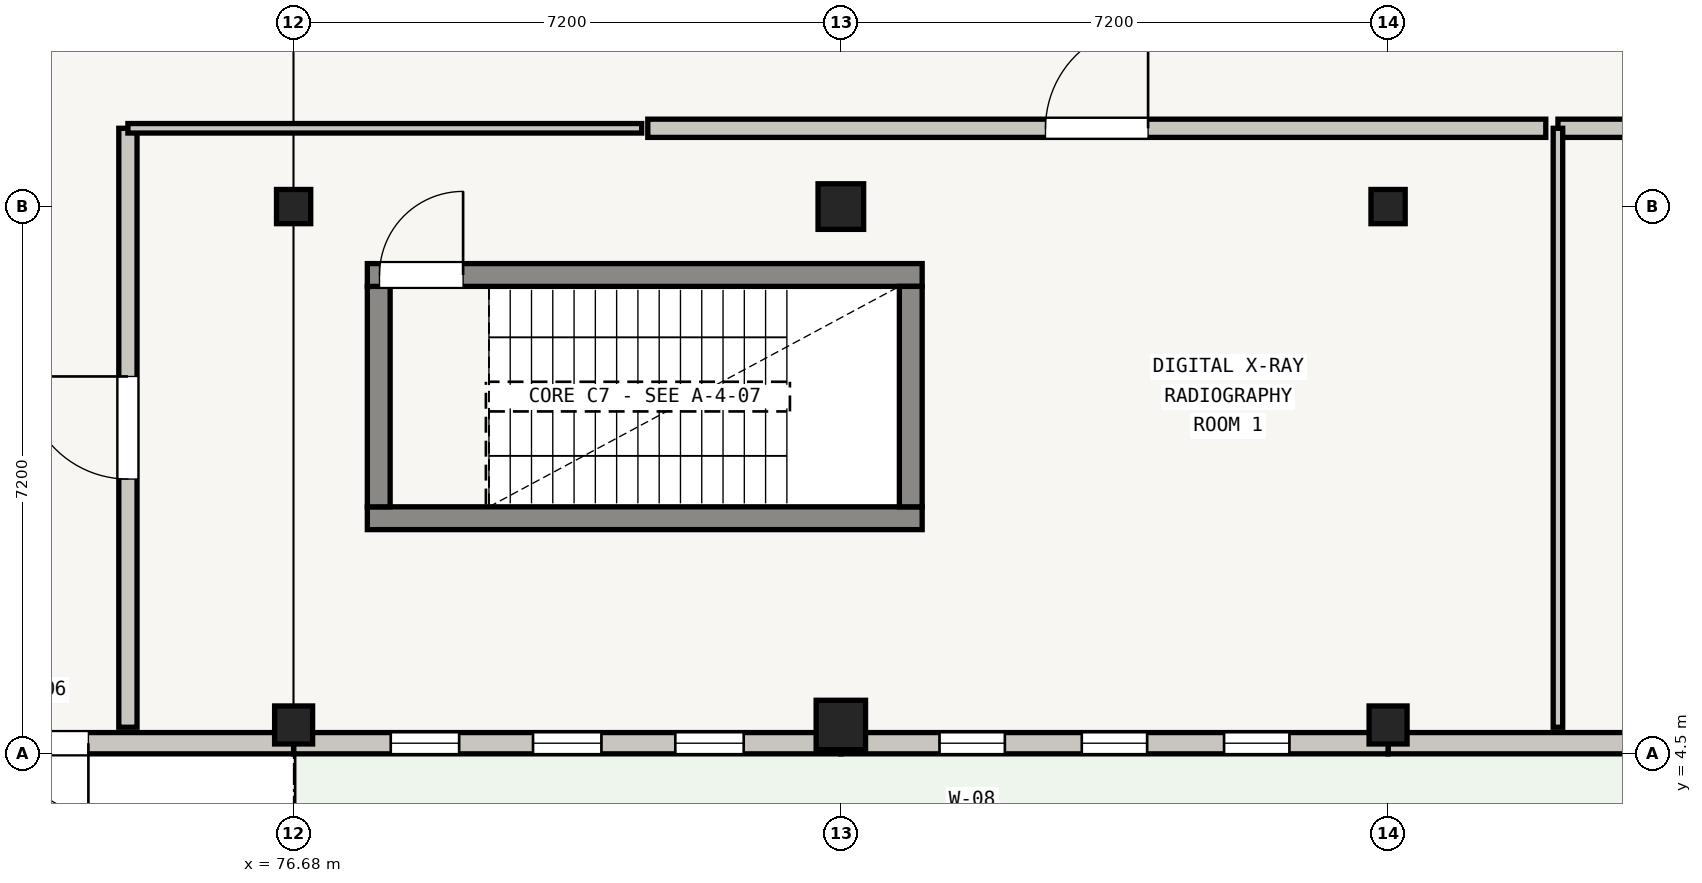
"""IFC4 building model, lengths in metres.
Left out: names, types, materials, properties, quantities, classifications, styles, units other than length and angle.
Written with IfcOpenShell. Run it as: python <this file> out.ifc"""

import sys

from ifc_helpers import new_model, si_unit, direction, frame, frame_2d, origin, origin_2d, place, context, subcontext, project, spatial, rectangle, extrude, element, fill, save


model = new_model("IFC4")
c1 = context("Model", 3, precision=1e-05, world=origin(), true_north=direction((0.0, 1.0)))
c2 = subcontext(c1, "Body", "Model", "MODEL_VIEW")
j1 = project(units=[si_unit("LENGTHUNIT", "METRE"), si_unit("PLANEANGLEUNIT", "RADIAN")], contexts=[c1])
p1 = place(None, origin())
s1 = spatial("IfcSite", under=j1, at=p1, CompositionType="ELEMENT")
p2 = place(p1, origin())
s2 = spatial("IfcBuilding", under=s1, at=p2, CompositionType="ELEMENT")
p3 = place(p2, origin())
s3 = spatial("IfcBuildingStorey", under=s2, at=p3, CompositionType="ELEMENT", Elevation=0.0)
p4 = place(p3, frame((76.68, 4.88, 0.0), z_axis=(0.0, 0.0, 1.0), x_axis=(1.0, 0.0, 0.0)))
e1 = element("IfcColumn", 1, at=p4, inside=s3, PredefinedType="COLUMN", context=c2, shape_type="SweptSolid", body=[
    extrude(rectangle(XDim=0.5, YDim=0.5, at=origin_2d()), origin(), (0.0, 0.0, 1.0), 4.185),
])
p5 = place(p3, frame((76.68, 11.7, 0.0), z_axis=(0.0, 0.0, 1.0), x_axis=(1.0, 0.0, 0.0)))
e2 = element("IfcColumn", 2, at=p5, inside=s3, PredefinedType="COLUMN", context=c2, shape_type="SweptSolid", body=[
    extrude(rectangle(XDim=0.45, YDim=0.45, at=origin_2d()), origin(), (0.0, 0.0, 1.0), 4.185),
])
p6 = place(p3, frame((83.88, 4.88, 0.0), z_axis=(0.0, 0.0, 1.0), x_axis=(1.0, 0.0, 0.0)))
e3 = element("IfcColumn", 3, at=p6, inside=s3, PredefinedType="COLUMN", context=c2, shape_type="SweptSolid", body=[
    extrude(rectangle(XDim=0.65, YDim=0.65, at=origin_2d()), origin(), (0.0, 0.0, 1.0), 4.185),
])
p7 = place(p3, frame((83.88, 11.7, 0.0), z_axis=(0.0, 0.0, 1.0), x_axis=(1.0, 0.0, 0.0)))
e4 = element("IfcColumn", 4, at=p7, inside=s3, PredefinedType="COLUMN", context=c2, shape_type="SweptSolid", body=[
    extrude(rectangle(XDim=0.6, YDim=0.6, at=origin_2d()), origin(), (0.0, 0.0, 1.0), 4.185),
])
p8 = place(p3, frame((91.08, 4.88, 0.0), z_axis=(0.0, 0.0, 1.0), x_axis=(1.0, 0.0, 0.0)))
e5 = element("IfcColumn", 5, at=p8, inside=s3, PredefinedType="COLUMN", context=c2, shape_type="SweptSolid", body=[
    extrude(rectangle(XDim=0.5, YDim=0.5, at=origin_2d()), origin(), (0.0, 0.0, 1.0), 4.185),
])
p9 = place(p3, frame((91.08, 11.7, 0.0), z_axis=(0.0, 0.0, 1.0), x_axis=(1.0, 0.0, 0.0)))
e6 = element("IfcColumn", 6, at=p9, inside=s3, PredefinedType="COLUMN", context=c2, shape_type="SweptSolid", body=[
    extrude(rectangle(XDim=0.45, YDim=0.45, at=origin_2d()), origin(), (0.0, 0.0, 1.0), 4.185),
])
p10 = place(p3, frame((98.28, 4.64, 0.0), z_axis=(0.0, 0.0, 1.0), x_axis=(-1.0, 0.0, 0.0)))
e7 = element("IfcWall", 7, at=p10, inside=s3, PredefinedType="STANDARD", context=c2, shape_type="SweptSolid", body=[
    extrude(rectangle(XDim=7.2, YDim=0.28, at=frame_2d((3.6, 0.0))), origin(), (0.0, 0.0, 1.0), 3.55),
])
p11 = place(p10, frame((1.318, 0.0, 0.55)))
e8 = element("IfcOpeningElement", 8, at=p11, cuts=e7, PredefinedType="OPENING", context=c2, shape_type="SweptSolid", body=[
    extrude(rectangle(XDim=0.82, YDim=2.2, at=frame_2d((0.41, 1.1))), frame((0.0, 0.14, 0.0), z_axis=(0.0, -1.0, 0.0), x_axis=(1.0, 0.0, 0.0)), (0.0, 0.0, 1.0), 0.28),
])
p12 = place(p10, frame((3.19, 0.0, 0.55)))
e9 = element("IfcOpeningElement", 9, at=p12, cuts=e7, PredefinedType="OPENING", context=c2, shape_type="SweptSolid", body=[
    extrude(rectangle(XDim=0.82, YDim=2.2, at=frame_2d((0.41, 1.1))), frame((0.0, 0.14, 0.0), z_axis=(0.0, -1.0, 0.0), x_axis=(1.0, 0.0, 0.0)), (0.0, 0.0, 1.0), 0.28),
])
p13 = place(p3, frame((91.08, 4.64, 0.0), z_axis=(0.0, 0.0, 1.0), x_axis=(-1.0, 0.0, 0.0)))
e10 = element("IfcWall", 10, at=p13, inside=s3, PredefinedType="STANDARD", context=c2, shape_type="SweptSolid", body=[
    extrude(rectangle(XDim=7.2, YDim=0.28, at=frame_2d((3.6, 0.0))), origin(), (0.0, 0.0, 1.0), 3.55),
])
p14 = place(p13, frame((1.298, 0.0, 0.55)))
e11 = element("IfcOpeningElement", 11, at=p14, cuts=e10, PredefinedType="OPENING", context=c2, shape_type="SweptSolid", body=[
    extrude(rectangle(XDim=0.86, YDim=2.2, at=frame_2d((0.43, 1.1))), frame((0.0, 0.14, 0.0), z_axis=(0.0, -1.0, 0.0), x_axis=(1.0, 0.0, 0.0)), (0.0, 0.0, 1.0), 0.28),
])
p15 = place(p13, frame((3.17, 0.0, 0.55)))
e12 = element("IfcOpeningElement", 12, at=p15, cuts=e10, PredefinedType="OPENING", context=c2, shape_type="SweptSolid", body=[
    extrude(rectangle(XDim=0.86, YDim=2.2, at=frame_2d((0.43, 1.1))), frame((0.0, 0.14, 0.0), z_axis=(0.0, -1.0, 0.0), x_axis=(1.0, 0.0, 0.0)), (0.0, 0.0, 1.0), 0.28),
])
p16 = place(p13, frame((5.042, 0.0, 0.55)))
e13 = element("IfcOpeningElement", 13, at=p16, cuts=e10, PredefinedType="OPENING", context=c2, shape_type="SweptSolid", body=[
    extrude(rectangle(XDim=0.86, YDim=2.2, at=frame_2d((0.43, 1.1))), frame((0.0, 0.14, 0.0), z_axis=(0.0, -1.0, 0.0), x_axis=(1.0, 0.0, 0.0)), (0.0, 0.0, 1.0), 0.28),
])
p17 = place(p3, frame((83.88, 4.64, 0.0), z_axis=(0.0, 0.0, 1.0), x_axis=(-1.0, 0.0, 0.0)))
e14 = element("IfcWall", 14, at=p17, inside=s3, PredefinedType="STANDARD", context=c2, shape_type="SweptSolid", body=[
    extrude(rectangle(XDim=7.2, YDim=0.28, at=frame_2d((3.6, 0.0))), origin(), (0.0, 0.0, 1.0), 3.55),
])
p18 = place(p17, frame((1.278, 0.0, 0.55)))
e15 = element("IfcOpeningElement", 15, at=p18, cuts=e14, PredefinedType="OPENING", context=c2, shape_type="SweptSolid", body=[
    extrude(rectangle(XDim=0.9, YDim=2.18, at=frame_2d((0.45, 1.09))), frame((0.0, 0.14, 0.0), z_axis=(0.0, -1.0, 0.0), x_axis=(1.0, 0.0, 0.0)), (0.0, 0.0, 1.0), 0.28),
])
p19 = place(p17, frame((3.15, 0.0, 0.55)))
e16 = element("IfcOpeningElement", 16, at=p19, cuts=e14, PredefinedType="OPENING", context=c2, shape_type="SweptSolid", body=[
    extrude(rectangle(XDim=0.9, YDim=2.18, at=frame_2d((0.45, 1.09))), frame((0.0, 0.14, 0.0), z_axis=(0.0, -1.0, 0.0), x_axis=(1.0, 0.0, 0.0)), (0.0, 0.0, 1.0), 0.28),
])
p20 = place(p17, frame((5.022, 0.0, 0.55)))
e17 = element("IfcOpeningElement", 17, at=p20, cuts=e14, PredefinedType="OPENING", context=c2, shape_type="SweptSolid", body=[
    extrude(rectangle(XDim=0.9, YDim=2.18, at=frame_2d((0.45, 1.09))), frame((0.0, 0.14, 0.0), z_axis=(0.0, -1.0, 0.0), x_axis=(1.0, 0.0, 0.0)), (0.0, 0.0, 1.0), 0.28),
])
p21 = place(p3, frame((76.68, 4.64, 0.0), z_axis=(0.0, 0.0, 1.0), x_axis=(-1.0, 0.0, 0.0)))
e18 = element("IfcWall", 18, at=p21, inside=s3, PredefinedType="STANDARD", context=c2, shape_type="SweptSolid", body=[
    extrude(rectangle(XDim=7.2, YDim=0.28, at=frame_2d((3.6, 0.0))), origin(), (0.0, 0.0, 1.0), 3.57),
])
p22 = place(p21, frame((2.7, 0.0, 0.0)))
e19 = element("IfcOpeningElement", 19, at=p22, cuts=e18, PredefinedType="OPENING", context=c2, shape_type="SweptSolid", body=[
    extrude(rectangle(XDim=1.8, YDim=2.1, at=frame_2d((0.9, 1.05))), frame((0.0, 0.14, 0.0), z_axis=(0.0, -1.0, 0.0), x_axis=(1.0, 0.0, 0.0)), (0.0, 0.0, 1.0), 0.28),
])
p23 = place(p3, frame((84.95, 7.6, 0.0), z_axis=(0.0, 0.0, 1.0), x_axis=(-1.0, 0.0, 0.0)))
e20 = element("IfcWall", 20, at=p23, inside=s3, PredefinedType="SHEAR", context=c2, shape_type="SweptSolid", body=[
    extrude(rectangle(XDim=7.3, YDim=0.3, at=frame_2d((3.65, 0.0))), origin(), (0.0, 0.0, 1.0), 4.185),
])
p24 = place(p3, frame((77.8, 7.75, 0.0), z_axis=(0.0, 0.0, 1.0), x_axis=(0.0, 1.0, 0.0)))
e21 = element("IfcWall", 21, at=p24, inside=s3, PredefinedType="SHEAR", context=c2, shape_type="SweptSolid", body=[
    extrude(rectangle(XDim=2.9, YDim=0.3, at=frame_2d((1.45, 0.0))), origin(), (0.0, 0.0, 1.0), 4.185),
])
p25 = place(p3, frame((77.65, 10.8, 0.0), z_axis=(0.0, 0.0, 1.0), x_axis=(1.0, 0.0, 0.0)))
e22 = element("IfcWall", 22, at=p25, inside=s3, PredefinedType="SHEAR", context=c2, shape_type="SweptSolid", body=[
    extrude(rectangle(XDim=7.3, YDim=0.3, at=frame_2d((3.65, 0.0))), origin(), (0.0, 0.0, 1.0), 4.185),
])
p26 = place(p25, frame((0.16, 0.0, 0.0)))
e23 = element("IfcOpeningElement", 23, at=p26, cuts=e22, PredefinedType="OPENING", context=c2, shape_type="SweptSolid", body=[
    extrude(rectangle(XDim=1.1, YDim=2.05, at=frame_2d((0.55, 1.025))), frame((0.0, 0.15, 0.0), z_axis=(0.0, -1.0, 0.0), x_axis=(1.0, 0.0, 0.0)), (0.0, 0.0, 1.0), 0.3),
])
p27 = place(p3, frame((84.8, 10.65, 0.0), z_axis=(0.0, 0.0, 1.0), x_axis=(0.0, -1.0, 0.0)))
e24 = element("IfcWall", 24, at=p27, inside=s3, PredefinedType="SHEAR", context=c2, shape_type="SweptSolid", body=[
    extrude(rectangle(XDim=2.9, YDim=0.3, at=frame_2d((1.45, 0.0))), origin(), (0.0, 0.0, 1.0), 4.185),
])
p28 = place(p3, frame((93.315, 12.73, 0.0), z_axis=(0.0, 0.0, 1.0), x_axis=(1.0, 0.0, 0.0)))
e25 = element("IfcWall", 25, at=p28, inside=s3, PredefinedType="SOLIDWALL", context=c2, shape_type="SweptSolid", body=[
    extrude(rectangle(XDim=11.815, YDim=0.24, at=frame_2d((5.907, 0.0))), origin(), (0.0, 0.0, 1.0), 3.205),
])
p29 = place(p28, frame((6.802, 0.0, 0.0)))
e26 = element("IfcOpeningElement", 26, at=p29, cuts=e25, PredefinedType="OPENING", context=c2, shape_type="SweptSolid", body=[
    extrude(rectangle(XDim=1.35, YDim=2.1, at=frame_2d((0.675, 1.05))), frame((0.0, 0.12, 0.0), z_axis=(0.0, -1.0, 0.0), x_axis=(1.0, 0.0, 0.0)), (0.0, 0.0, 1.0), 0.24),
])
p30 = place(p3, frame((93.315, 4.85, 0.0), z_axis=(0.0, 0.0, 1.0), x_axis=(0.0, 1.0, 0.0)))
e27 = element("IfcWall", 27, at=p30, inside=s3, PredefinedType="PARTITIONING", context=c2, shape_type="SweptSolid", body=[
    extrude(rectangle(XDim=7.88, YDim=0.125, at=frame_2d((3.94, 0.0))), origin(), (0.0, 0.0, 1.0), 3.205),
])
p31 = place(p3, frame((81.34, 12.73, 0.0), z_axis=(0.0, 0.0, 1.0), x_axis=(1.0, 0.0, 0.0)))
e28 = element("IfcWall", 28, at=p31, inside=s3, PredefinedType="SOLIDWALL", context=c2, shape_type="SweptSolid", body=[
    extrude(rectangle(XDim=11.815, YDim=0.24, at=frame_2d((5.907, 0.0))), origin(), (0.0, 0.0, 1.0), 3.205),
])
p32 = place(p31, frame((5.232, 0.0, 0.0)))
e29 = element("IfcOpeningElement", 29, at=p32, cuts=e28, PredefinedType="OPENING", context=c2, shape_type="SweptSolid", body=[
    extrude(rectangle(XDim=1.35, YDim=2.1, at=frame_2d((0.675, 1.05))), frame((0.0, 0.12, 0.0), z_axis=(0.0, -1.0, 0.0), x_axis=(1.0, 0.0, 0.0)), (0.0, 0.0, 1.0), 0.24),
])
p33 = place(p3, frame((74.5, 4.85, 0.0), z_axis=(0.0, 0.0, 1.0), x_axis=(0.0, 1.0, 0.0)))
e30 = element("IfcWall", 30, at=p33, inside=s3, PredefinedType="SOLIDWALL", context=c2, shape_type="SweptSolid", body=[
    extrude(rectangle(XDim=7.88, YDim=0.24, at=frame_2d((3.94, 0.0))), origin(), (0.0, 0.0, 1.0), 3.205),
])
p34 = place(p33, frame((3.265, 0.0, 0.0)))
e31 = element("IfcOpeningElement", 31, at=p34, cuts=e30, PredefinedType="OPENING", context=c2, shape_type="SweptSolid", body=[
    extrude(rectangle(XDim=1.35, YDim=2.1, at=frame_2d((0.675, 1.05))), frame((0.0, 0.12, 0.0), z_axis=(0.0, -1.0, 0.0), x_axis=(1.0, 0.0, 0.0)), (0.0, 0.0, 1.0), 0.24),
])
p35 = place(p3, frame((74.5, 12.73, 0.0), z_axis=(0.0, 0.0, 1.0), x_axis=(1.0, 0.0, 0.0)))
e32 = element("IfcWall", 32, at=p35, inside=s3, PredefinedType="PARTITIONING", context=c2, shape_type="SweptSolid", body=[
    extrude(rectangle(XDim=6.76, YDim=0.125, at=frame_2d((3.38, 0.0))), origin(), (0.0, 0.0, 1.0), 3.205),
])
p36 = place(p14, origin())
e33 = element("IfcWindow", 33, at=p36, inside=s3, PartitioningType="SINGLE_PANEL", PredefinedType="WINDOW", context=c2, shape_type="SweptSolid", body=[
    extrude(rectangle(XDim=0.86, YDim=2.2, at=frame_2d((0.43, 1.1))), frame((0.0, 0.03, 0.0), z_axis=(0.0, -1.0, 0.0), x_axis=(1.0, 0.0, 0.0)), (0.0, 0.0, 1.0), 0.06),
])
fill(e11, e33)
p37 = place(p15, origin())
e34 = element("IfcWindow", 34, at=p37, inside=s3, PartitioningType="SINGLE_PANEL", PredefinedType="WINDOW", context=c2, shape_type="SweptSolid", body=[
    extrude(rectangle(XDim=0.86, YDim=2.2, at=frame_2d((0.43, 1.1))), frame((0.0, 0.03, 0.0), z_axis=(0.0, -1.0, 0.0), x_axis=(1.0, 0.0, 0.0)), (0.0, 0.0, 1.0), 0.06),
])
fill(e12, e34)
p38 = place(p16, origin())
e35 = element("IfcWindow", 35, at=p38, inside=s3, PartitioningType="SINGLE_PANEL", PredefinedType="WINDOW", context=c2, shape_type="SweptSolid", body=[
    extrude(rectangle(XDim=0.86, YDim=2.2, at=frame_2d((0.43, 1.1))), frame((0.0, 0.03, 0.0), z_axis=(0.0, -1.0, 0.0), x_axis=(1.0, 0.0, 0.0)), (0.0, 0.0, 1.0), 0.06),
])
fill(e13, e35)
p39 = place(p18, origin())
e36 = element("IfcWindow", 36, at=p39, inside=s3, PartitioningType="DOUBLE_PANEL_VERTICAL", PredefinedType="WINDOW", context=c2, shape_type="SweptSolid", body=[
    extrude(rectangle(XDim=0.9, YDim=2.18, at=frame_2d((0.45, 1.09))), frame((0.0, 0.03, 0.0), z_axis=(0.0, -1.0, 0.0), x_axis=(1.0, 0.0, 0.0)), (0.0, 0.0, 1.0), 0.06),
])
fill(e15, e36)
p40 = place(p19, origin())
e37 = element("IfcWindow", 37, at=p40, inside=s3, PartitioningType="DOUBLE_PANEL_VERTICAL", PredefinedType="WINDOW", context=c2, shape_type="SweptSolid", body=[
    extrude(rectangle(XDim=0.9, YDim=2.18, at=frame_2d((0.45, 1.09))), frame((0.0, 0.03, 0.0), z_axis=(0.0, -1.0, 0.0), x_axis=(1.0, 0.0, 0.0)), (0.0, 0.0, 1.0), 0.06),
])
fill(e16, e37)
p41 = place(p20, origin())
e38 = element("IfcWindow", 38, at=p41, inside=s3, PartitioningType="DOUBLE_PANEL_VERTICAL", PredefinedType="WINDOW", context=c2, shape_type="SweptSolid", body=[
    extrude(rectangle(XDim=0.9, YDim=2.18, at=frame_2d((0.45, 1.09))), frame((0.0, 0.03, 0.0), z_axis=(0.0, -1.0, 0.0), x_axis=(1.0, 0.0, 0.0)), (0.0, 0.0, 1.0), 0.06),
])
fill(e17, e38)
p42 = place(p22, origin())
e39 = element("IfcDoor", 39, at=p42, inside=s3, OperationType="DOUBLE_DOOR_SINGLE_SWING", PredefinedType="DOOR", context=c2, shape_type="SweptSolid", body=[
    extrude(rectangle(XDim=1.8, YDim=2.1, at=frame_2d((0.9, 1.05))), frame((0.0, 0.025, 0.0), z_axis=(0.0, -1.0, 0.0), x_axis=(1.0, 0.0, 0.0)), (0.0, 0.0, 1.0), 0.05),
])
fill(e19, e39)
p43 = place(p26, origin())
e40 = element("IfcDoor", 40, at=p43, inside=s3, OperationType="SINGLE_SWING_RIGHT", PredefinedType="DOOR", context=c2, shape_type="SweptSolid", body=[
    extrude(rectangle(XDim=1.1, YDim=2.05, at=frame_2d((0.55, 1.025))), frame((0.0, 0.025, 0.0), z_axis=(0.0, -1.0, 0.0), x_axis=(1.0, 0.0, 0.0)), (0.0, 0.0, 1.0), 0.05),
])
fill(e23, e40)
p44 = place(p32, origin())
e41 = element("IfcDoor", 41, at=p44, inside=s3, OperationType="SINGLE_SWING_RIGHT", PredefinedType="DOOR", context=c2, shape_type="SweptSolid", body=[
    extrude(rectangle(XDim=1.35, YDim=2.1, at=frame_2d((0.675, 1.05))), frame((0.0, 0.025, 0.0), z_axis=(0.0, -1.0, 0.0), x_axis=(1.0, 0.0, 0.0)), (0.0, 0.0, 1.0), 0.05),
])
fill(e29, e41)
p45 = place(p34, origin())
e42 = element("IfcDoor", 42, at=p45, inside=s3, OperationType="SINGLE_SWING_RIGHT", PredefinedType="DOOR", context=c2, shape_type="SweptSolid", body=[
    extrude(rectangle(XDim=1.35, YDim=2.1, at=frame_2d((0.675, 1.05))), frame((0.0, 0.025, 0.0), z_axis=(0.0, -1.0, 0.0), x_axis=(1.0, 0.0, 0.0)), (0.0, 0.0, 1.0), 0.05),
])
fill(e31, e42)
save(model, sys.argv[1])
